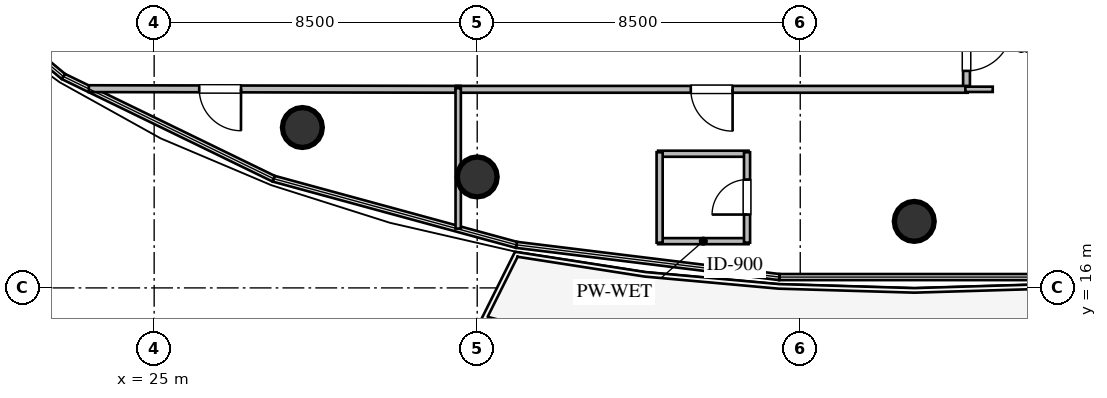
"""IFC4 building model, lengths in metres.
Left out: names, types, materials, properties, quantities, classifications, styles, units other than length and angle.
Written with IfcOpenShell. Run it as: python <this file> out.ifc"""

import sys

from ifc_helpers import new_model, si_unit, direction, frame, frame_2d, origin, origin_2d, place, context, subcontext, project, spatial, rectangle, circle, extrude, element, fill, save


model = new_model("IFC4")
c1 = context("Model", 3, precision=1e-05, world=origin(), true_north=direction((0.0, 1.0)))
c2 = subcontext(c1, "Body", "Model", "MODEL_VIEW")
j1 = project(units=[si_unit("LENGTHUNIT", "METRE"), si_unit("PLANEANGLEUNIT", "RADIAN")], contexts=[c1])
p1 = place(None, origin())
s1 = spatial("IfcSite", under=j1, at=p1, CompositionType="ELEMENT")
p2 = place(p1, origin())
s2 = spatial("IfcBuilding", under=s1, at=p2, CompositionType="ELEMENT")
p3 = place(p2, frame((0.0, 0.0, 195.6)))
s3 = spatial("IfcBuildingStorey", under=s2, at=p3, CompositionType="ELEMENT", Elevation=195.6)
for number, where, z_axis, x_axis in (
    (1, (28.9, 20.22, 0.0), (0.0, 0.0, 1.0), (1.0, 0.0, 0.0)),
    (2, (33.5, 18.92, 0.0), (0.0, 0.0, 1.0), (1.0, 0.0, 0.0)),
    (3, (45.0, 17.75, 0.0), (0.0, 0.0, 1.0), (1.0, 0.0, 0.0)),
):
    element("IfcColumn", number, at=place(p3, frame(where, z_axis=z_axis, x_axis=x_axis)), inside=s3, PredefinedType="COLUMN", context=c2, shape_type="SweptSolid", body=[
        extrude(circle(Radius=0.525, at=origin_2d()), origin(), (0.0, 0.0, 1.0), 3.6),
    ])
for number, where, z_axis, x_axis in (
    (4, (38.26, 17.23, 0.0), (0.0, 0.0, 1.0), (1.0, 0.0, 0.0)),
    (5, (38.26, 19.53, 0.0), (0.0, 0.0, 1.0), (1.0, 0.0, 0.0)),
):
    element("IfcWall", number, at=place(p3, frame(where, z_axis=z_axis, x_axis=x_axis)), inside=s3, PredefinedType="PLUMBINGWALL", context=c2, shape_type="SweptSolid", body=[
        extrude(rectangle(XDim=2.38, YDim=0.16, at=frame_2d((1.19, 0.0))), origin(), (0.0, 0.0, 1.0), 3.36),
    ])
p4 = place(p3, frame((38.3, 17.19, 0.0), z_axis=(0.0, 0.0, 1.0), x_axis=(0.0, 1.0, 0.0)))
e6 = element("IfcWall", 6, at=p4, inside=s3, PredefinedType="PLUMBINGWALL", context=c2, shape_type="SweptSolid", body=[
    extrude(rectangle(XDim=2.38, YDim=0.16, at=frame_2d((1.19, 0.0))), origin(), (0.0, 0.0, 1.0), 3.36),
])
p5 = place(p3, frame((40.6, 17.19, 0.0), z_axis=(0.0, 0.0, 1.0), x_axis=(0.0, 1.0, 0.0)))
e7 = element("IfcWall", 7, at=p5, inside=s3, PredefinedType="PLUMBINGWALL", context=c2, shape_type="SweptSolid", body=[
    extrude(rectangle(XDim=2.38, YDim=0.16, at=frame_2d((1.19, 0.0))), origin(), (0.0, 0.0, 1.0), 3.36),
])
p6 = place(p5, frame((0.74, 0.0, 0.0)))
e8 = element("IfcOpeningElement", 8, at=p6, cuts=e7, PredefinedType="OPENING", context=c2, shape_type="SweptSolid", body=[
    extrude(rectangle(XDim=0.92, YDim=2.1, at=frame_2d((0.46, 1.05))), frame((0.0, 0.09, 0.0), z_axis=(0.0, -1.0, 0.0), x_axis=(1.0, 0.0, 0.0)), (0.0, 0.0, 1.0), 0.18),
])
p7 = place(p3, frame((46.375, 23.425, 0.0), z_axis=(0.0, 0.0, 1.0), x_axis=(0.0, -1.0, 0.0)))
e9 = element("IfcWall", 9, at=p7, inside=s3, PredefinedType="PARTITIONING", context=c2, shape_type="SweptSolid", body=[
    extrude(rectangle(XDim=2.23, YDim=0.18, at=frame_2d((1.115, 0.0))), origin(), (0.0, 0.0, 1.0), 3.36),
])
p8 = place(p7, frame((0.515, 0.0, 0.0)))
e10 = element("IfcOpeningElement", 10, at=p8, cuts=e9, PredefinedType="OPENING", context=c2, shape_type="SweptSolid", body=[
    extrude(rectangle(XDim=1.2, YDim=2.15, at=frame_2d((0.6, 1.075))), frame((0.0, 0.1, 0.0), z_axis=(0.0, -1.0, 0.0), x_axis=(1.0, 0.0, 0.0)), (0.0, 0.0, 1.0), 0.2),
])
p9 = place(p3, frame((33.065, 21.225, 0.0), z_axis=(0.0, 0.0, 1.0), x_axis=(-0.99999847448, 0.001746722226, 0.0)))
e11 = element("IfcWall", 11, at=p9, inside=s3, PredefinedType="PARTITIONING", context=c2, shape_type="SweptSolid", body=[
    extrude(rectangle(XDim=9.784, YDim=0.18, at=frame_2d((4.892, 0.0))), origin(), (0.0, 0.0, 1.0), 2.89),
])
p10 = place(p9, frame((5.779, 0.0, 0.0)))
e12 = element("IfcOpeningElement", 12, at=p10, cuts=e11, PredefinedType="OPENING", context=c2, shape_type="SweptSolid", body=[
    extrude(rectangle(XDim=1.1, YDim=2.1, at=frame_2d((0.55, 1.05))), frame((0.0, 0.1, 0.0), z_axis=(0.0, -1.0, 0.0), x_axis=(1.0, 0.0, 0.0)), (0.0, 0.0, 1.0), 0.2),
])
p11 = place(p3, frame((46.405, 21.225, 0.0), z_axis=(0.0, 0.0, 1.0), x_axis=(-1.0, 0.0, 0.0)))
e13 = element("IfcWall", 13, at=p11, inside=s3, PredefinedType="PARTITIONING", context=c2, shape_type="SweptSolid", body=[
    extrude(rectangle(XDim=13.47, YDim=0.18, at=frame_2d((6.735, 0.0))), origin(), (0.0, 0.0, 1.0), 2.996),
])
p12 = place(p11, frame((6.185, 0.0, 0.0)))
e14 = element("IfcOpeningElement", 14, at=p12, cuts=e13, PredefinedType="OPENING", context=c2, shape_type="SweptSolid", body=[
    extrude(rectangle(XDim=1.1, YDim=2.1, at=frame_2d((0.55, 1.05))), frame((0.0, 0.1, 0.0), z_axis=(0.0, -1.0, 0.0), x_axis=(1.0, 0.0, 0.0)), (0.0, 0.0, 1.0), 0.2),
])
p13 = place(p3, frame((47.065, 21.225, 0.0), z_axis=(0.0, 0.0, 1.0), x_axis=(-1.0, 0.0, 0.0)))
e15 = element("IfcWall", 15, at=p13, inside=s3, PredefinedType="PARTITIONING", context=c2, shape_type="SweptSolid", body=[
    extrude(rectangle(XDim=0.72, YDim=0.14, at=frame_2d((0.36, 0.0))), origin(), (0.0, 0.0, 1.0), 2.996),
])
p14 = place(p3, frame((33.0, 21.255, 0.0), z_axis=(0.0, 0.0, 1.0), x_axis=(0.0, -1.0, 0.0)))
e16 = element("IfcWall", 16, at=p14, inside=s3, PredefinedType="PARTITIONING", context=c2, shape_type="SweptSolid", body=[
    extrude(rectangle(XDim=3.695, YDim=0.14, at=frame_2d((1.847, 0.0))), origin(), (0.0, 0.0, 1.0), 3.36),
])
p15 = place(p6, origin())
e17 = element("IfcDoor", 17, at=p15, inside=s3, OperationType="SINGLE_SWING_LEFT", PredefinedType="DOOR", context=c2, shape_type="SweptSolid", body=[
    extrude(rectangle(XDim=0.92, YDim=2.1, at=frame_2d((0.46, 1.05))), frame((0.0, 0.025, 0.0), z_axis=(0.0, -1.0, 0.0), x_axis=(1.0, 0.0, 0.0)), (0.0, 0.0, 1.0), 0.05),
])
fill(e8, e17)
p16 = place(p8, origin())
e18 = element("IfcDoor", 18, at=p16, inside=s3, OperationType="SINGLE_SWING_LEFT", PredefinedType="DOOR", context=c2, shape_type="SweptSolid", body=[
    extrude(rectangle(XDim=1.2, YDim=2.15, at=frame_2d((0.6, 1.075))), frame((0.0, 0.025, 0.0), z_axis=(0.0, -1.0, 0.0), x_axis=(1.0, 0.0, 0.0)), (0.0, 0.0, 1.0), 0.05),
])
fill(e10, e18)
p17 = place(p10, origin())
e19 = element("IfcDoor", 19, at=p17, inside=s3, OperationType="SINGLE_SWING_LEFT", PredefinedType="DOOR", context=c2, shape_type="SweptSolid", body=[
    extrude(rectangle(XDim=1.1, YDim=2.1, at=frame_2d((0.55, 1.05))), frame((0.0, 0.025, 0.0), z_axis=(0.0, -1.0, 0.0), x_axis=(1.0, 0.0, 0.0)), (0.0, 0.0, 1.0), 0.05),
])
fill(e12, e19)
p18 = place(p12, origin())
e20 = element("IfcDoor", 20, at=p18, inside=s3, OperationType="SINGLE_SWING_LEFT", PredefinedType="DOOR", context=c2, shape_type="SweptSolid", body=[
    extrude(rectangle(XDim=1.1, YDim=2.1, at=frame_2d((0.55, 1.05))), frame((0.0, 0.025, 0.0), z_axis=(0.0, -1.0, 0.0), x_axis=(1.0, 0.0, 0.0)), (0.0, 0.0, 1.0), 0.05),
])
fill(e14, e20)
save(model, sys.argv[1])
